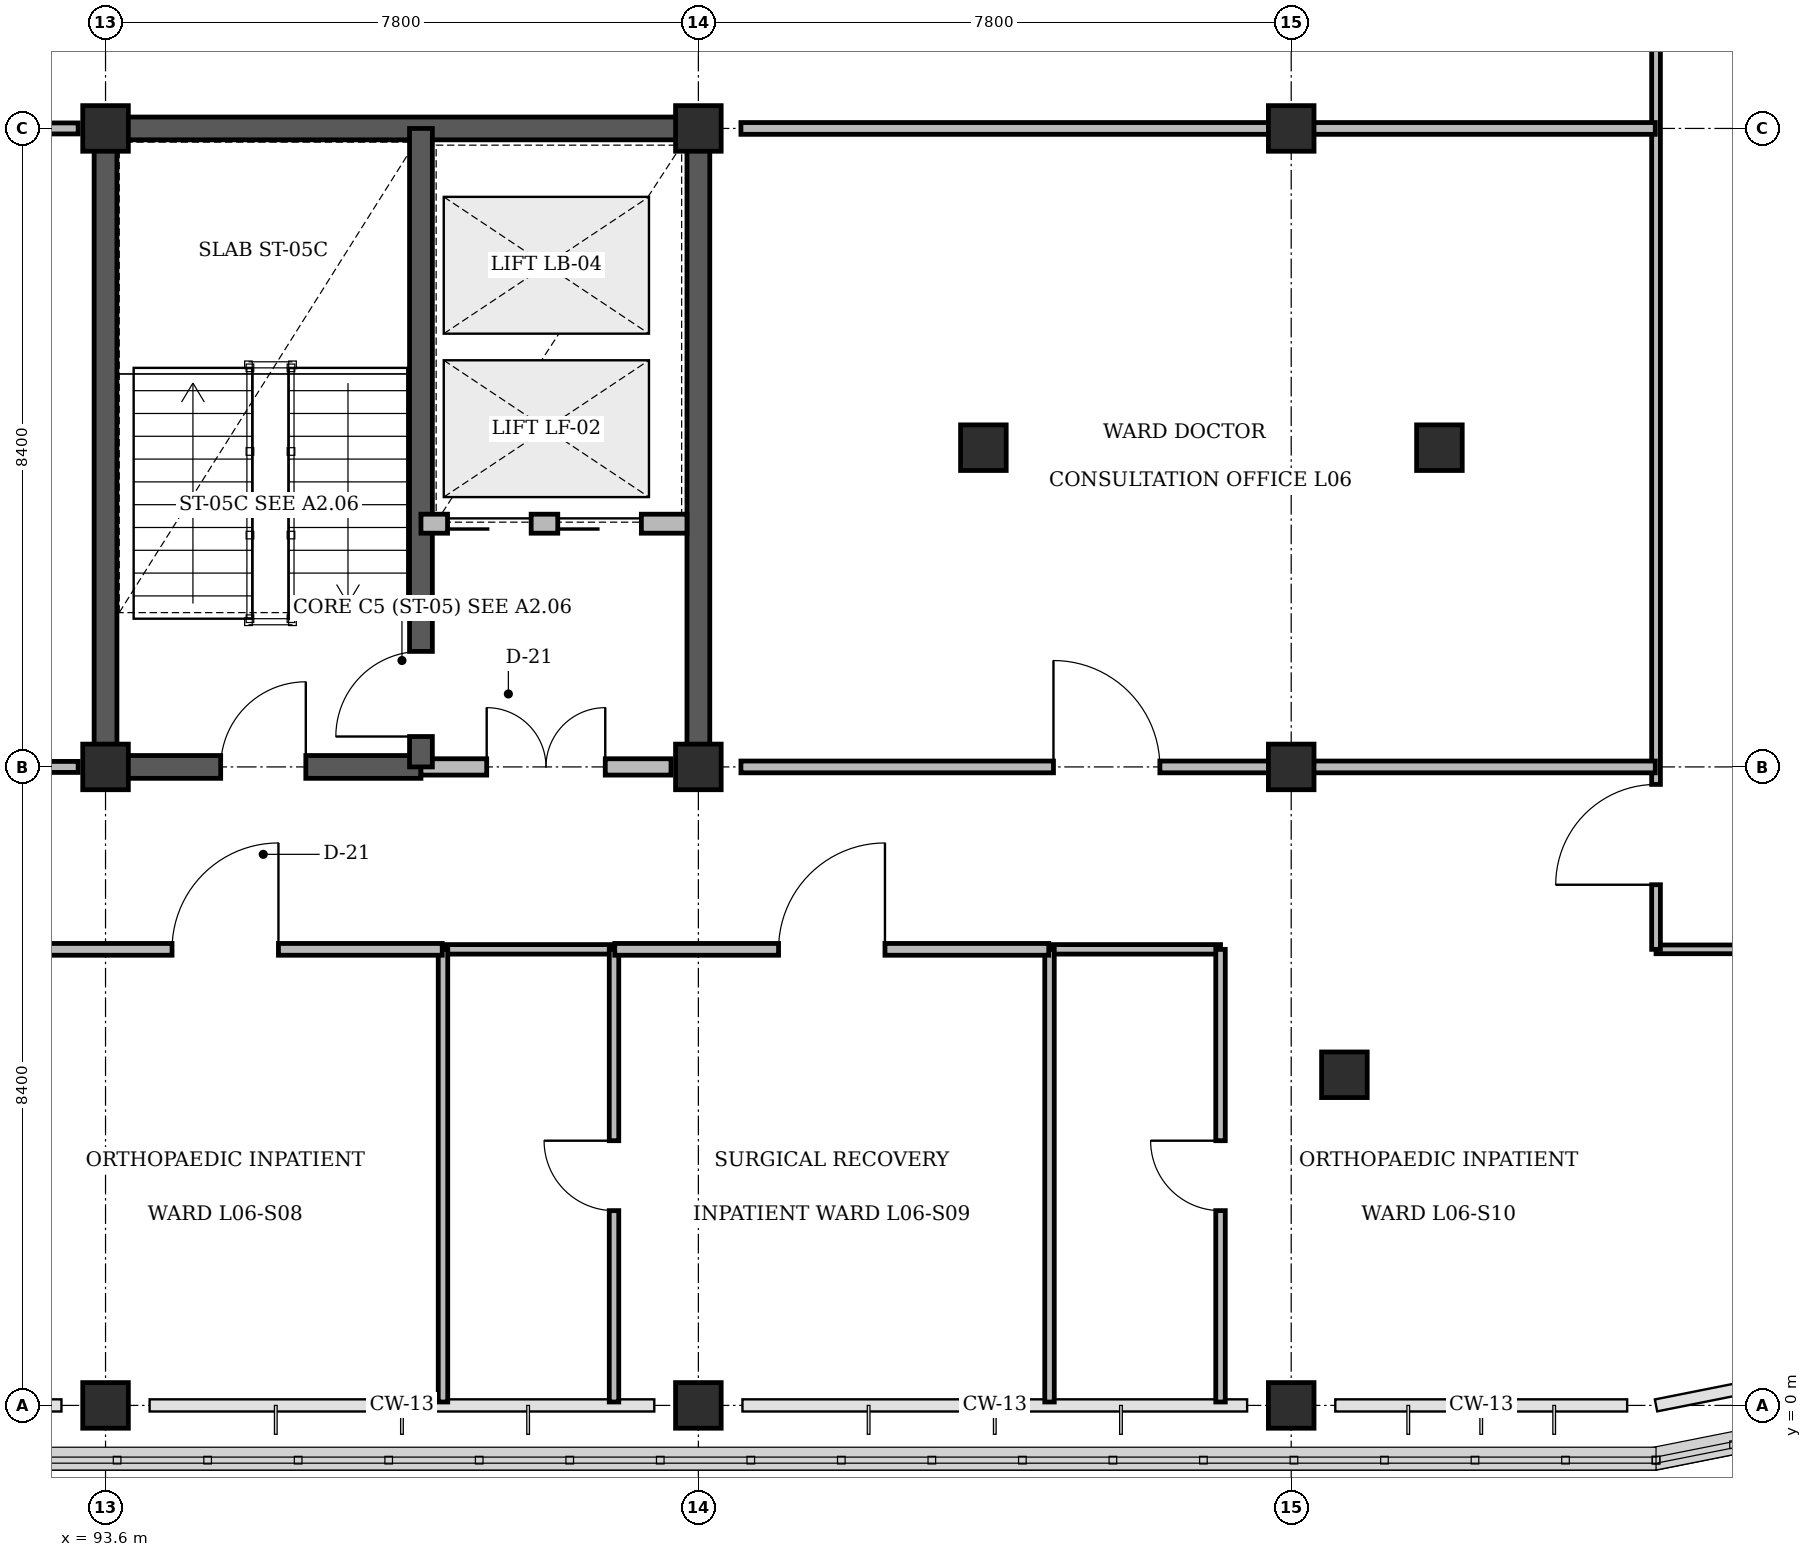
"""IFC4 building model, lengths in metres.
Left out: names, types, materials, properties, quantities, classifications, styles, units other than length and angle.
Written with IfcOpenShell. Run it as: python <this file> out.ifc"""

import sys

from ifc_helpers import new_model, si_unit, direction, frame, frame_2d, origin, origin_2d, place, context, subcontext, project, spatial, rectangle, circle, extrude, element, fill, save


model = new_model("IFC4")
c1 = context("Model", 3, precision=1e-05, world=origin(), true_north=direction((0.0, 1.0)))
c2 = subcontext(c1, "Body", "Model", "MODEL_VIEW")
j1 = project(units=[si_unit("LENGTHUNIT", "METRE"), si_unit("PLANEANGLEUNIT", "RADIAN")], contexts=[c1])
p1 = place(None, origin())
s1 = spatial("IfcSite", under=j1, at=p1, CompositionType="ELEMENT")
p2 = place(p1, origin())
s2 = spatial("IfcBuilding", under=s1, at=p2, CompositionType="ELEMENT")
p3 = place(p2, frame((0.0, 0.0, 26.4)))
s3 = spatial("IfcBuildingStorey", under=s2, at=p3, CompositionType="ELEMENT", Elevation=26.4)
p4 = place(p3, frame((93.45, 16.8, 0.0), z_axis=(0.0, 0.0, 1.0), x_axis=(1.0, 0.0, 0.0)))
e1 = element("IfcWall", 1, at=p4, inside=s3, PredefinedType="SHEAR", context=c2, shape_type="SweptSolid", body=[
    extrude(rectangle(XDim=8.1, YDim=0.3, at=frame_2d((4.05, 0.0))), origin(), (0.0, 0.0, 1.0), 3.92),
])
for number, where, z_axis, x_axis in (
    (2, (93.6, 8.4, 0.0), (0.0, 0.0, 1.0), (0.0, 1.0, 0.0)),
    (3, (101.4, 8.4, 0.0), (0.0, 0.0, 1.0), (0.0, 1.0, 0.0)),
):
    element("IfcWall", number, at=place(p3, frame(where, z_axis=z_axis, x_axis=x_axis)), inside=s3, PredefinedType="SHEAR", context=c2, shape_type="SweptSolid", body=[
        extrude(rectangle(XDim=8.4, YDim=0.3, at=frame_2d((4.2, 0.0))), origin(), (0.0, 0.0, 1.0), 3.92),
    ])
for number, where, z_axis, x_axis in (
    (4, (93.6, 0.0, 0.0), (0.0, 0.0, 1.0), (1.0, 0.0, 0.0)),
    (5, (93.6, 8.4, 0.0), (0.0, 0.0, 1.0), (1.0, 0.0, 0.0)),
    (6, (93.6, 16.8, 0.0), (0.0, 0.0, 1.0), (1.0, 0.0, 0.0)),
    (7, (101.4, 0.0, 0.0), (0.0, 0.0, 1.0), (1.0, 0.0, 0.0)),
    (8, (101.4, 8.4, 0.0), (0.0, 0.0, 1.0), (1.0, 0.0, 0.0)),
    (9, (101.4, 16.8, 0.0), (0.0, 0.0, 1.0), (1.0, 0.0, 0.0)),
    (10, (109.2, 0.0, 0.0), (0.0, 0.0, 1.0), (1.0, 0.0, 0.0)),
    (11, (109.2, 8.4, 0.0), (0.0, 0.0, 1.0), (1.0, 0.0, 0.0)),
    (12, (109.2, 16.8, 0.0), (0.0, 0.0, 1.0), (1.0, 0.0, 0.0)),
):
    element("IfcColumn", number, at=place(p3, frame(where, z_axis=z_axis, x_axis=x_axis)), inside=s3, PredefinedType="COLUMN", context=c2, shape_type="SweptSolid", body=[
        extrude(rectangle(XDim=0.6, YDim=0.6, at=origin_2d()), origin(), (0.0, 0.0, 1.0), 4.2),
    ])
for number, where, z_axis, x_axis in (
    (13, (111.15, 12.6, 0.0), (0.0, 0.0, 1.0), (1.0, 0.0, 0.0)),
    (14, (109.9, 4.35, 0.0), (0.0, 0.0, 1.0), (1.0, 0.0, 0.0)),
    (15, (105.15, 12.6, 0.0), (0.0, 0.0, 1.0), (1.0, 0.0, 0.0)),
):
    element("IfcColumn", number, at=place(p3, frame(where, z_axis=z_axis, x_axis=x_axis)), inside=s3, PredefinedType="PILASTER", context=c2, shape_type="SweptSolid", body=[
        extrude(circle(Radius=0.3, at=origin_2d()), origin(), (0.0, 0.0, 1.0), 4.2),
    ])
p5 = place(p3, frame((93.6, 8.4, 0.0), z_axis=(0.0, 0.0, 1.0), x_axis=(1.0, 0.0, 0.0)))
e16 = element("IfcWall", 16, at=p5, inside=s3, PredefinedType="SHEAR", context=c2, shape_type="SweptSolid", body=[
    extrude(rectangle(XDim=4.15, YDim=0.3, at=frame_2d((2.075, 0.0))), origin(), (0.0, 0.0, 1.0), 4.2),
])
p6 = place(p5, frame((1.515, 0.0, 0.0)))
e17 = element("IfcOpeningElement", 17, at=p6, cuts=e16, PredefinedType="OPENING", context=c2, shape_type="SweptSolid", body=[
    extrude(rectangle(XDim=1.12, YDim=2.15, at=frame_2d((0.56, 1.075))), frame((0.0, 0.16, 0.0), z_axis=(0.0, -1.0, 0.0), x_axis=(1.0, 0.0, 0.0)), (0.0, 0.0, 1.0), 0.32),
])
p7 = place(p3, frame((97.75, 8.4, 0.0), z_axis=(0.0, 0.0, 1.0), x_axis=(1.0, 0.0, 0.0)))
e18 = element("IfcWall", 18, at=p7, inside=s3, PredefinedType="STANDARD", context=c2, shape_type="SweptSolid", body=[
    extrude(rectangle(XDim=3.29, YDim=0.215, at=frame_2d((1.645, 0.0))), origin(), (0.0, 0.0, 1.0), 3.27),
])
p8 = place(p7, frame((0.865, 0.0, 0.0)))
e19 = element("IfcOpeningElement", 19, at=p8, cuts=e18, PredefinedType="OPENING", context=c2, shape_type="SweptSolid", body=[
    extrude(rectangle(XDim=1.56, YDim=2.2, at=frame_2d((0.78, 1.1))), frame((0.0, 0.118, 0.0), z_axis=(0.0, -1.0, 0.0), x_axis=(1.0, 0.0, 0.0)), (0.0, 0.0, 1.0), 0.235),
])
p9 = place(p3, frame((97.75, 8.4, 0.0), z_axis=(0.0, 0.0, 1.0), x_axis=(0.0, 1.0, 0.0)))
e20 = element("IfcWall", 20, at=p9, inside=s3, PredefinedType="SHEAR", context=c2, shape_type="SweptSolid", body=[
    extrude(rectangle(XDim=8.4, YDim=0.3, at=frame_2d((4.2, 0.0))), origin(), (0.0, 0.0, 1.0), 4.2),
])
p10 = place(p9, frame((0.4, 0.0, 0.0)))
e21 = element("IfcOpeningElement", 21, at=p10, cuts=e20, PredefinedType="OPENING", context=c2, shape_type="SweptSolid", body=[
    extrude(rectangle(XDim=1.12, YDim=2.15, at=frame_2d((0.56, 1.075))), frame((0.0, 0.16, 0.0), z_axis=(0.0, -1.0, 0.0), x_axis=(1.0, 0.0, 0.0)), (0.0, 0.0, 1.0), 0.32),
])
p11 = place(p3, frame((97.75, 11.6, 0.0), z_axis=(0.0, 0.0, 1.0), x_axis=(1.0, 0.0, 0.0)))
e22 = element("IfcWall", 22, at=p11, inside=s3, PredefinedType="STANDARD", context=c2, shape_type="SweptSolid", body=[
    extrude(rectangle(XDim=3.5, YDim=0.25, at=frame_2d((1.75, 0.0))), origin(), (0.0, 0.0, 1.0), 3.9),
])
p12 = place(p11, frame((0.35, 0.0, 0.0)))
e23 = element("IfcOpeningElement", 23, at=p12, cuts=e22, PredefinedType="OPENING", context=c2, shape_type="SweptSolid", body=[
    extrude(rectangle(XDim=1.1, YDim=2.2, at=frame_2d((0.55, 1.1))), frame((0.0, 0.135, 0.0), z_axis=(0.0, -1.0, 0.0), x_axis=(1.0, 0.0, 0.0)), (0.0, 0.0, 1.0), 0.27),
])
p13 = place(p11, frame((1.8, 0.0, 0.0)))
e24 = element("IfcOpeningElement", 24, at=p13, cuts=e22, PredefinedType="OPENING", context=c2, shape_type="SweptSolid", body=[
    extrude(rectangle(XDim=1.1, YDim=2.2, at=frame_2d((0.55, 1.1))), frame((0.0, 0.135, 0.0), z_axis=(0.0, -1.0, 0.0), x_axis=(1.0, 0.0, 0.0)), (0.0, 0.0, 1.0), 0.27),
])
p14 = place(p3, frame((98.04, 6.0, 0.0), z_axis=(0.0, 0.0, 1.0), x_axis=(1.0, 0.0, 0.0)))
e25 = element("IfcWall", 25, at=p14, inside=s3, PredefinedType="PARTITIONING", context=c2, shape_type="SweptSolid", body=[
    extrude(rectangle(XDim=2.25, YDim=0.125, at=frame_2d((1.125, 0.0))), origin(), (0.0, 0.0, 1.0), 3.9),
])
p15 = place(p3, frame((98.04, 0.045, 0.0), z_axis=(0.0, 0.0, 1.0), x_axis=(0.0, 1.0, 0.0)))
e26 = element("IfcWall", 26, at=p15, inside=s3, PredefinedType="PARTITIONING", context=c2, shape_type="SweptSolid", body=[
    extrude(rectangle(XDim=5.955, YDim=0.125, at=frame_2d((2.978, 0.0))), origin(), (0.0, 0.0, 1.0), 3.9),
])
p16 = place(p3, frame((100.29, 0.045, 0.0), z_axis=(0.0, 0.0, 1.0), x_axis=(0.0, 1.0, 0.0)))
e27 = element("IfcWall", 27, at=p16, inside=s3, PredefinedType="PARTITIONING", context=c2, shape_type="SweptSolid", body=[
    extrude(rectangle(XDim=5.955, YDim=0.125, at=frame_2d((2.978, 0.0))), origin(), (0.0, 0.0, 1.0), 3.9),
])
p17 = place(p16, frame((2.518, 0.0, 0.0)))
e28 = element("IfcOpeningElement", 28, at=p17, cuts=e27, PredefinedType="OPENING", context=c2, shape_type="SweptSolid", body=[
    extrude(rectangle(XDim=0.92, YDim=2.1, at=frame_2d((0.46, 1.05))), frame((0.0, 0.073, 0.0), z_axis=(0.0, -1.0, 0.0), x_axis=(1.0, 0.0, 0.0)), (0.0, 0.0, 1.0), 0.145),
])
p18 = place(p3, frame((106.02, 6.0, 0.0), z_axis=(0.0, 0.0, 1.0), x_axis=(1.0, 0.0, 0.0)))
e29 = element("IfcWall", 29, at=p18, inside=s3, PredefinedType="PARTITIONING", context=c2, shape_type="SweptSolid", body=[
    extrude(rectangle(XDim=2.25, YDim=0.125, at=frame_2d((1.125, 0.0))), origin(), (0.0, 0.0, 1.0), 3.9),
])
p19 = place(p3, frame((106.02, 0.045, 0.0), z_axis=(0.0, 0.0, 1.0), x_axis=(0.0, 1.0, 0.0)))
e30 = element("IfcWall", 30, at=p19, inside=s3, PredefinedType="PARTITIONING", context=c2, shape_type="SweptSolid", body=[
    extrude(rectangle(XDim=5.955, YDim=0.125, at=frame_2d((2.978, 0.0))), origin(), (0.0, 0.0, 1.0), 3.9),
])
p20 = place(p3, frame((108.27, 0.045, 0.0), z_axis=(0.0, 0.0, 1.0), x_axis=(0.0, 1.0, 0.0)))
e31 = element("IfcWall", 31, at=p20, inside=s3, PredefinedType="PARTITIONING", context=c2, shape_type="SweptSolid", body=[
    extrude(rectangle(XDim=5.955, YDim=0.125, at=frame_2d((2.978, 0.0))), origin(), (0.0, 0.0, 1.0), 3.9),
])
p21 = place(p20, frame((2.518, 0.0, 0.0)))
e32 = element("IfcOpeningElement", 32, at=p21, cuts=e31, PredefinedType="OPENING", context=c2, shape_type="SweptSolid", body=[
    extrude(rectangle(XDim=0.92, YDim=2.1, at=frame_2d((0.46, 1.05))), frame((0.0, 0.073, 0.0), z_axis=(0.0, -1.0, 0.0), x_axis=(1.0, 0.0, 0.0)), (0.0, 0.0, 1.0), 0.145),
])
p22 = place(p3, frame((114.0, 6.0, 0.0), z_axis=(0.0, 0.0, 1.0), x_axis=(1.0, 0.0, 0.0)))
e33 = element("IfcWall", 33, at=p22, inside=s3, PredefinedType="PARTITIONING", context=c2, shape_type="SweptSolid", body=[
    extrude(rectangle(XDim=12.1, YDim=0.115, at=frame_2d((6.05, 0.0))), origin(), (0.0, 0.0, 1.0), 3.9),
])
p23 = place(p3, frame((114.0, 6.0, 0.0), z_axis=(0.0, 0.0, 1.0), x_axis=(0.0, 1.0, 0.0)))
e34 = element("IfcWall", 34, at=p23, inside=s3, PredefinedType="PARTITIONING", context=c2, shape_type="SweptSolid", body=[
    extrude(rectangle(XDim=13.2, YDim=0.115, at=frame_2d((6.6, 0.0))), origin(), (0.0, 0.0, 1.0), 3.9),
])
p24 = place(p23, frame((0.85, 0.0, 0.0)))
e35 = element("IfcOpeningElement", 35, at=p24, cuts=e34, PredefinedType="OPENING", context=c2, shape_type="SweptSolid", body=[
    extrude(rectangle(XDim=1.32, YDim=2.15, at=frame_2d((0.66, 1.075))), frame((0.0, 0.067, 0.0), z_axis=(0.0, -1.0, 0.0), x_axis=(1.0, 0.0, 0.0)), (0.0, 0.0, 1.0), 0.135),
])
p25 = place(p3, frame((92.32, 6.0, 0.0), z_axis=(0.0, 0.0, 1.0), x_axis=(1.0, 0.0, 0.0)))
e36 = element("IfcWall", 36, at=p25, inside=s3, PredefinedType="PARTITIONING", context=c2, shape_type="SweptSolid", body=[
    extrude(rectangle(XDim=5.71, YDim=0.155, at=frame_2d((2.855, 0.0))), origin(), (0.0, 0.0, 1.0), 3.9),
])
p26 = place(p25, frame((2.155, 0.0, 0.0)))
e37 = element("IfcOpeningElement", 37, at=p26, cuts=e36, PredefinedType="OPENING", context=c2, shape_type="SweptSolid", body=[
    extrude(rectangle(XDim=1.4, YDim=2.2, at=frame_2d((0.7, 1.1))), frame((0.0, 0.087, 0.0), z_axis=(0.0, -1.0, 0.0), x_axis=(1.0, 0.0, 0.0)), (0.0, 0.0, 1.0), 0.175),
])
p27 = place(p3, frame((100.3, 6.0, 0.0), z_axis=(0.0, 0.0, 1.0), x_axis=(1.0, 0.0, 0.0)))
e38 = element("IfcWall", 38, at=p27, inside=s3, PredefinedType="PARTITIONING", context=c2, shape_type="SweptSolid", body=[
    extrude(rectangle(XDim=5.71, YDim=0.155, at=frame_2d((2.855, 0.0))), origin(), (0.0, 0.0, 1.0), 3.9),
])
p28 = place(p27, frame((2.155, 0.0, 0.0)))
e39 = element("IfcOpeningElement", 39, at=p28, cuts=e38, PredefinedType="OPENING", context=c2, shape_type="SweptSolid", body=[
    extrude(rectangle(XDim=1.4, YDim=2.2, at=frame_2d((0.7, 1.1))), frame((0.0, 0.087, 0.0), z_axis=(0.0, -1.0, 0.0), x_axis=(1.0, 0.0, 0.0)), (0.0, 0.0, 1.0), 0.175),
])
p29 = place(p3, frame((86.16, 8.4, 0.0), z_axis=(0.0, 0.0, 1.0), x_axis=(1.0, 0.0, 0.0)))
e40 = element("IfcWall", 40, at=p29, inside=s3, PredefinedType="PARTITIONING", context=c2, shape_type="SweptSolid", body=[
    extrude(rectangle(XDim=7.08, YDim=0.145, at=frame_2d((3.54, 0.0))), origin(), (0.0, 0.0, 1.0), 3.27),
])
p30 = place(p29, frame((2.78, 0.0, 0.0)))
e41 = element("IfcOpeningElement", 41, at=p30, cuts=e40, PredefinedType="OPENING", context=c2, shape_type="SweptSolid", body=[
    extrude(rectangle(XDim=1.52, YDim=2.2, at=frame_2d((0.76, 1.1))), frame((0.0, 0.083, 0.0), z_axis=(0.0, -1.0, 0.0), x_axis=(1.0, 0.0, 0.0)), (0.0, 0.0, 1.0), 0.165),
])
p31 = place(p3, frame((86.16, 16.8, 0.0), z_axis=(0.0, 0.0, 1.0), x_axis=(1.0, 0.0, 0.0)))
e42 = element("IfcWall", 42, at=p31, inside=s3, PredefinedType="PARTITIONING", context=c2, shape_type="SweptSolid", body=[
    extrude(rectangle(XDim=7.08, YDim=0.145, at=frame_2d((3.54, 0.0))), origin(), (0.0, 0.0, 1.0), 3.27),
])
p32 = place(p3, frame((101.96, 8.4, 0.0), z_axis=(0.0, 0.0, 1.0), x_axis=(1.0, 0.0, 0.0)))
e43 = element("IfcWall", 43, at=p32, inside=s3, PredefinedType="PARTITIONING", context=c2, shape_type="SweptSolid", body=[
    extrude(rectangle(XDim=12.03, YDim=0.155, at=frame_2d((6.015, 0.0))), origin(), (0.0, 0.0, 1.0), 3.27),
])
p33 = place(p32, frame((4.112, 0.0, 0.0)))
e44 = element("IfcOpeningElement", 44, at=p33, cuts=e43, PredefinedType="OPENING", context=c2, shape_type="SweptSolid", body=[
    extrude(rectangle(XDim=1.4, YDim=2.2, at=frame_2d((0.7, 1.1))), frame((0.0, 0.087, 0.0), z_axis=(0.0, -1.0, 0.0), x_axis=(1.0, 0.0, 0.0)), (0.0, 0.0, 1.0), 0.175),
])
p34 = place(p3, frame((101.96, 16.8, 0.0), z_axis=(0.0, 0.0, 1.0), x_axis=(1.0, 0.0, 0.0)))
e45 = element("IfcWall", 45, at=p34, inside=s3, PredefinedType="PARTITIONING", context=c2, shape_type="SweptSolid", body=[
    extrude(rectangle(XDim=12.03, YDim=0.155, at=frame_2d((6.015, 0.0))), origin(), (0.0, 0.0, 1.0), 3.27),
])
p35 = place(p6, origin())
e46 = element("IfcDoor", 46, at=p35, inside=s3, OperationType="SINGLE_SWING_RIGHT", PredefinedType="DOOR", context=c2, shape_type="SweptSolid", body=[
    extrude(rectangle(XDim=1.12, YDim=2.15, at=frame_2d((0.56, 1.075))), frame((0.0, 0.025, 0.0), z_axis=(0.0, -1.0, 0.0), x_axis=(1.0, 0.0, 0.0)), (0.0, 0.0, 1.0), 0.05),
])
fill(e17, e46)
p36 = place(p8, origin())
e47 = element("IfcDoor", 47, at=p36, inside=s3, OperationType="DOUBLE_DOOR_SINGLE_SWING", PredefinedType="DOOR", context=c2, shape_type="SweptSolid", body=[
    extrude(rectangle(XDim=1.56, YDim=2.2, at=frame_2d((0.78, 1.1))), frame((0.0, 0.025, 0.0), z_axis=(0.0, -1.0, 0.0), x_axis=(1.0, 0.0, 0.0)), (0.0, 0.0, 1.0), 0.05),
])
fill(e19, e47)
p37 = place(p10, origin())
e48 = element("IfcDoor", 48, at=p37, inside=s3, OperationType="SINGLE_SWING_LEFT", PredefinedType="DOOR", context=c2, shape_type="SweptSolid", body=[
    extrude(rectangle(XDim=1.12, YDim=2.15, at=frame_2d((0.56, 1.075))), frame((0.0, 0.025, 0.0), z_axis=(0.0, -1.0, 0.0), x_axis=(1.0, 0.0, 0.0)), (0.0, 0.0, 1.0), 0.05),
])
fill(e21, e48)
p38 = place(p12, origin())
e49 = element("IfcDoor", 49, at=p38, inside=s3, OperationType="SLIDING_TO_LEFT", PredefinedType="DOOR", context=c2, shape_type="SweptSolid", body=[
    extrude(rectangle(XDim=1.1, YDim=2.2, at=frame_2d((0.55, 1.1))), frame((0.0, 0.025, 0.0), z_axis=(0.0, -1.0, 0.0), x_axis=(1.0, 0.0, 0.0)), (0.0, 0.0, 1.0), 0.05),
])
fill(e23, e49)
p39 = place(p13, origin())
e50 = element("IfcDoor", 50, at=p39, inside=s3, OperationType="SLIDING_TO_LEFT", PredefinedType="DOOR", context=c2, shape_type="SweptSolid", body=[
    extrude(rectangle(XDim=1.1, YDim=2.2, at=frame_2d((0.55, 1.1))), frame((0.0, 0.025, 0.0), z_axis=(0.0, -1.0, 0.0), x_axis=(1.0, 0.0, 0.0)), (0.0, 0.0, 1.0), 0.05),
])
fill(e24, e50)
p40 = place(p17, origin())
e51 = element("IfcDoor", 51, at=p40, inside=s3, OperationType="SINGLE_SWING_RIGHT", PredefinedType="DOOR", context=c2, shape_type="SweptSolid", body=[
    extrude(rectangle(XDim=0.92, YDim=2.1, at=frame_2d((0.46, 1.05))), frame((0.0, 0.025, 0.0), z_axis=(0.0, -1.0, 0.0), x_axis=(1.0, 0.0, 0.0)), (0.0, 0.0, 1.0), 0.05),
])
fill(e28, e51)
p41 = place(p21, origin())
e52 = element("IfcDoor", 52, at=p41, inside=s3, OperationType="SINGLE_SWING_RIGHT", PredefinedType="DOOR", context=c2, shape_type="SweptSolid", body=[
    extrude(rectangle(XDim=0.92, YDim=2.1, at=frame_2d((0.46, 1.05))), frame((0.0, 0.025, 0.0), z_axis=(0.0, -1.0, 0.0), x_axis=(1.0, 0.0, 0.0)), (0.0, 0.0, 1.0), 0.05),
])
fill(e32, e52)
p42 = place(p24, origin())
e53 = element("IfcDoor", 53, at=p42, inside=s3, OperationType="SINGLE_SWING_LEFT", PredefinedType="DOOR", context=c2, shape_type="SweptSolid", body=[
    extrude(rectangle(XDim=1.32, YDim=2.15, at=frame_2d((0.66, 1.075))), frame((0.0, 0.025, 0.0), z_axis=(0.0, -1.0, 0.0), x_axis=(1.0, 0.0, 0.0)), (0.0, 0.0, 1.0), 0.05),
])
fill(e35, e53)
p43 = place(p26, origin())
e54 = element("IfcDoor", 54, at=p43, inside=s3, OperationType="SINGLE_SWING_RIGHT", PredefinedType="DOOR", context=c2, shape_type="SweptSolid", body=[
    extrude(rectangle(XDim=1.4, YDim=2.2, at=frame_2d((0.7, 1.1))), frame((0.0, 0.025, 0.0), z_axis=(0.0, -1.0, 0.0), x_axis=(1.0, 0.0, 0.0)), (0.0, 0.0, 1.0), 0.05),
])
fill(e37, e54)
p44 = place(p28, origin())
e55 = element("IfcDoor", 55, at=p44, inside=s3, OperationType="SINGLE_SWING_RIGHT", PredefinedType="DOOR", context=c2, shape_type="SweptSolid", body=[
    extrude(rectangle(XDim=1.4, YDim=2.2, at=frame_2d((0.7, 1.1))), frame((0.0, 0.025, 0.0), z_axis=(0.0, -1.0, 0.0), x_axis=(1.0, 0.0, 0.0)), (0.0, 0.0, 1.0), 0.05),
])
fill(e39, e55)
p45 = place(p33, origin())
e56 = element("IfcDoor", 56, at=p45, inside=s3, OperationType="SINGLE_SWING_LEFT", PredefinedType="DOOR", context=c2, shape_type="SweptSolid", body=[
    extrude(rectangle(XDim=1.4, YDim=2.2, at=frame_2d((0.7, 1.1))), frame((0.0, 0.025, 0.0), z_axis=(0.0, -1.0, 0.0), x_axis=(1.0, 0.0, 0.0)), (0.0, 0.0, 1.0), 0.05),
])
fill(e44, e56)
save(model, sys.argv[1])
